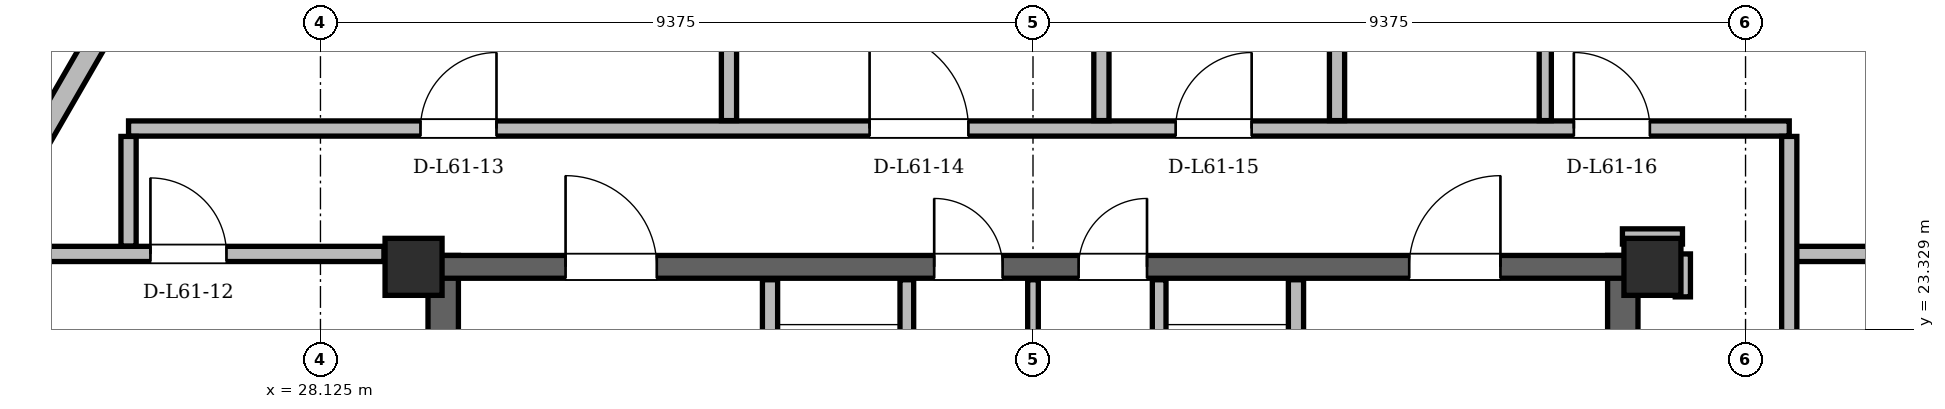
"""IFC4 building model, lengths in metres.
Left out: names, types, materials, properties, quantities, classifications, styles, units other than length and angle.
Written with IfcOpenShell. Run it as: python <this file> out.ifc"""

import sys

from ifc_helpers import new_model, si_unit, direction, frame, frame_2d, origin, origin_2d, place, context, subcontext, project, spatial, rectangle, hollow_rectangle, extrude, element, fill, save


model = new_model("IFC4")
c1 = context("Model", 3, precision=1e-05, world=origin(), true_north=direction((0.0, 1.0)))
c2 = subcontext(c1, "Body", "Model", "MODEL_VIEW")
j1 = project(units=[si_unit("LENGTHUNIT", "METRE"), si_unit("PLANEANGLEUNIT", "RADIAN")], contexts=[c1])
p1 = place(None, origin())
s1 = spatial("IfcSite", under=j1, at=p1, CompositionType="ELEMENT")
p2 = place(p1, origin())
s2 = spatial("IfcBuilding", under=s1, at=p2, CompositionType="ELEMENT")
p3 = place(p2, frame((0.0, 0.0, 230.7)))
s3 = spatial("IfcBuildingStorey", under=s2, at=p3, CompositionType="ELEMENT", Elevation=230.7)
for number, where, z_axis, x_axis in (
    (1, (45.65, 24.15, 0.0), (0.0, 0.0, 1.0), (1.0, 0.0, 0.0)),
    (2, (29.35, 24.15, 0.0), (0.0, 0.0, 1.0), (1.0, 0.0, 0.0)),
):
    element("IfcColumn", number, at=place(p3, frame(where, z_axis=z_axis, x_axis=x_axis)), inside=s3, PredefinedType="COLUMN", context=c2, shape_type="SweptSolid", body=[
        extrude(hollow_rectangle(XDim=0.75, YDim=0.75, WallThickness=0.06, at=origin_2d()), origin(), (0.0, 0.0, 1.0), 3.6),
    ])
for number, where, z_axis, x_axis in (
    (3, (29.74, 11.0, 0.0), (0.0, 0.0, 1.0), (0.0, 1.0, 0.0)),
    (4, (45.26, 11.0, 0.0), (0.0, 0.0, 1.0), (0.0, 1.0, 0.0)),
):
    element("IfcWall", number, at=place(p3, frame(where, z_axis=z_axis, x_axis=x_axis)), inside=s3, PredefinedType="SHEAR", context=c2, shape_type="SweptSolid", body=[
        extrude(rectangle(XDim=13.3, YDim=0.4, at=frame_2d((6.65, 0.0))), origin(), (0.0, 0.0, 1.0), 3.38),
    ])
p4 = place(p3, frame((29.65, 24.15, 0.0), z_axis=(0.0, 0.0, 1.0), x_axis=(1.0, 0.0, 0.0)))
e5 = element("IfcWall", 5, at=p4, inside=s3, PredefinedType="SHEAR", context=c2, shape_type="SweptSolid", body=[
    extrude(rectangle(XDim=15.7, YDim=0.3, at=frame_2d((7.85, 0.0))), origin(), (0.0, 0.0, 1.0), 3.38),
])
p5 = place(p4, frame((1.7, 0.0, 0.0)))
e6 = element("IfcOpeningElement", 6, at=p5, cuts=e5, PredefinedType="OPENING", context=c2, shape_type="SweptSolid", body=[
    extrude(rectangle(XDim=1.2, YDim=2.2, at=frame_2d((0.6, 1.1))), frame((0.0, 0.15, 0.0), z_axis=(0.0, -1.0, 0.0), x_axis=(1.0, 0.0, 0.0)), (0.0, 0.0, 1.0), 0.3),
])
p6 = place(p4, frame((12.8, 0.0, 0.0)))
e7 = element("IfcOpeningElement", 7, at=p6, cuts=e5, PredefinedType="OPENING", context=c2, shape_type="SweptSolid", body=[
    extrude(rectangle(XDim=1.2, YDim=2.2, at=frame_2d((0.6, 1.1))), frame((0.0, 0.15, 0.0), z_axis=(0.0, -1.0, 0.0), x_axis=(1.0, 0.0, 0.0)), (0.0, 0.0, 1.0), 0.3),
])
p7 = place(p4, frame((6.55, 0.0, 0.0)))
e8 = element("IfcOpeningElement", 8, at=p7, cuts=e5, PredefinedType="OPENING", context=c2, shape_type="SweptSolid", body=[
    extrude(rectangle(XDim=0.9, YDim=2.05, at=frame_2d((0.45, 1.025))), frame((0.0, 0.15, 0.0), z_axis=(0.0, -1.0, 0.0), x_axis=(1.0, 0.0, 0.0)), (0.0, 0.0, 1.0), 0.3),
])
p8 = place(p4, frame((8.45, 0.0, 0.0)))
e9 = element("IfcOpeningElement", 9, at=p8, cuts=e5, PredefinedType="OPENING", context=c2, shape_type="SweptSolid", body=[
    extrude(rectangle(XDim=0.9, YDim=2.05, at=frame_2d((0.45, 1.025))), frame((0.0, 0.15, 0.0), z_axis=(0.0, -1.0, 0.0), x_axis=(1.0, 0.0, 0.0)), (0.0, 0.0, 1.0), 0.3),
])
p9 = place(p3, frame((58.984, 11.26, 0.0), z_axis=(0.0, 0.0, 1.0), x_axis=(-0.50000331183, 0.86602349169, 0.0)))
e10 = element("IfcWall", 10, at=p9, inside=s3, PredefinedType="SOLIDWALL", context=c2, shape_type="SweptSolid", body=[
    extrude(rectangle(XDim=36.795, YDim=0.29, at=frame_2d((18.397, 0.0))), origin(), (0.0, 0.0, 1.0), 2.677),
])
p10 = place(p9, frame((3.219, 0.0, 0.0)))
e11 = element("IfcOpeningElement", 11, at=p10, cuts=e10, PredefinedType="OPENING", context=c2, shape_type="SweptSolid", body=[
    extrude(rectangle(XDim=1.5, YDim=2.2, at=frame_2d((0.75, 1.1))), frame((0.0, 0.145, 0.0), z_axis=(0.0, -1.0, 0.0), x_axis=(1.0, 0.0, 0.0)), (0.0, 0.0, 1.0), 0.29),
])
p11 = place(p9, frame((27.151, 0.0, 0.0)))
e12 = element("IfcOpeningElement", 12, at=p11, cuts=e10, PredefinedType="OPENING", context=c2, shape_type="SweptSolid", body=[
    extrude(rectangle(XDim=1.3, YDim=2.2, at=frame_2d((0.65, 1.1))), frame((0.0, 0.145, 0.0), z_axis=(0.0, -1.0, 0.0), x_axis=(1.0, 0.0, 0.0)), (0.0, 0.0, 1.0), 0.29),
])
p12 = place(p9, frame((1.169, 0.0, 0.85)))
e13 = element("IfcOpeningElement", 13, at=p12, cuts=e10, PredefinedType="OPENING", context=c2, shape_type="SweptSolid", body=[
    extrude(rectangle(XDim=1.2, YDim=1.48, at=frame_2d((0.6, 0.74))), frame((0.0, 0.145, 0.0), z_axis=(0.0, -1.0, 0.0), x_axis=(1.0, 0.0, 0.0)), (0.0, 0.0, 1.0), 0.29),
])
p13 = place(p9, frame((7.888, 0.0, 0.85)))
e14 = element("IfcOpeningElement", 14, at=p13, cuts=e10, PredefinedType="OPENING", context=c2, shape_type="SweptSolid", body=[
    extrude(rectangle(XDim=1.2, YDim=1.48, at=frame_2d((0.6, 0.74))), frame((0.0, 0.145, 0.0), z_axis=(0.0, -1.0, 0.0), x_axis=(1.0, 0.0, 0.0)), (0.0, 0.0, 1.0), 0.29),
])
p14 = place(p9, frame((32.464, 0.0, 0.85)))
e15 = element("IfcOpeningElement", 15, at=p14, cuts=e10, PredefinedType="OPENING", context=c2, shape_type="SweptSolid", body=[
    extrude(rectangle(XDim=1.2, YDim=1.48, at=frame_2d((0.6, 0.74))), frame((0.0, 0.145, 0.0), z_axis=(0.0, -1.0, 0.0), x_axis=(1.0, 0.0, 0.0)), (0.0, 0.0, 1.0), 0.29),
])
p15 = place(p9, frame((16.904, 0.0, 0.85)))
e16 = element("IfcOpeningElement", 16, at=p15, cuts=e10, PredefinedType="OPENING", context=c2, shape_type="SweptSolid", body=[
    extrude(rectangle(XDim=2.0, YDim=1.717, at=frame_2d((1.0, 0.858))), frame((0.0, 0.145, 0.0), z_axis=(0.0, -1.0, 0.0), x_axis=(1.0, 0.0, 0.0)), (0.0, 0.0, 1.0), 0.29),
])
p16 = place(p9, frame((23.036, 0.0, 0.85)))
e17 = element("IfcOpeningElement", 17, at=p16, cuts=e10, PredefinedType="OPENING", context=c2, shape_type="SweptSolid", body=[
    extrude(rectangle(XDim=1.4, YDim=1.6, at=frame_2d((0.7, 0.8))), frame((0.0, 0.145, 0.0), z_axis=(0.0, -1.0, 0.0), x_axis=(1.0, 0.0, 0.0)), (0.0, 0.0, 1.0), 0.29),
])
p17 = place(p3, frame((34.414, 43.126, 0.0), z_axis=(0.0, 0.0, 1.0), x_axis=(-0.50000331183, -0.86602349169, 0.0)))
e18 = element("IfcWall", 18, at=p17, inside=s3, PredefinedType="SOLIDWALL", context=c2, shape_type="SweptSolid", body=[
    extrude(rectangle(XDim=36.795, YDim=0.29, at=frame_2d((18.397, 0.0))), origin(), (0.0, 0.0, 1.0), 2.677),
])
p18 = place(p17, frame((3.529, 0.0, 0.0)))
e19 = element("IfcOpeningElement", 19, at=p18, cuts=e18, PredefinedType="OPENING", context=c2, shape_type="SweptSolid", body=[
    extrude(rectangle(XDim=1.3, YDim=2.2, at=frame_2d((0.65, 1.1))), frame((0.0, 0.145, 0.0), z_axis=(0.0, -1.0, 0.0), x_axis=(1.0, 0.0, 0.0)), (0.0, 0.0, 1.0), 0.29),
])
p19 = place(p17, frame((27.261, 0.0, 0.0)))
e20 = element("IfcOpeningElement", 20, at=p19, cuts=e18, PredefinedType="OPENING", context=c2, shape_type="SweptSolid", body=[
    extrude(rectangle(XDim=1.5, YDim=2.2, at=frame_2d((0.75, 1.1))), frame((0.0, 0.145, 0.0), z_axis=(0.0, -1.0, 0.0), x_axis=(1.0, 0.0, 0.0)), (0.0, 0.0, 1.0), 0.29),
])
p20 = place(p17, frame((22.271, 0.0, 0.85)))
e21 = element("IfcOpeningElement", 21, at=p20, cuts=e18, PredefinedType="OPENING", context=c2, shape_type="SweptSolid", body=[
    extrude(rectangle(XDim=2.4, YDim=1.717, at=frame_2d((1.2, 0.858))), frame((0.0, 0.145, 0.0), z_axis=(0.0, -1.0, 0.0), x_axis=(1.0, 0.0, 0.0)), (0.0, 0.0, 1.0), 0.29),
])
p21 = place(p17, frame((33.406, 0.0, 0.85)))
e22 = element("IfcOpeningElement", 22, at=p21, cuts=e18, PredefinedType="OPENING", context=c2, shape_type="SweptSolid", body=[
    extrude(rectangle(XDim=2.2, YDim=1.717, at=frame_2d((1.1, 0.858))), frame((0.0, 0.145, 0.0), z_axis=(0.0, -1.0, 0.0), x_axis=(1.0, 0.0, 0.0)), (0.0, 0.0, 1.0), 0.29),
])
p22 = place(p17, frame((11.662, 0.0, 0.85)))
e23 = element("IfcOpeningElement", 23, at=p22, cuts=e18, PredefinedType="OPENING", context=c2, shape_type="SweptSolid", body=[
    extrude(rectangle(XDim=1.2, YDim=1.48, at=frame_2d((0.6, 0.74))), frame((0.0, 0.145, 0.0), z_axis=(0.0, -1.0, 0.0), x_axis=(1.0, 0.0, 0.0)), (0.0, 0.0, 1.0), 0.29),
])
p23 = place(p17, frame((16.295, 0.0, 0.85)))
e24 = element("IfcOpeningElement", 24, at=p23, cuts=e18, PredefinedType="OPENING", context=c2, shape_type="SweptSolid", body=[
    extrude(rectangle(XDim=1.8, YDim=1.717, at=frame_2d((0.9, 0.858))), frame((0.0, 0.145, 0.0), z_axis=(0.0, -1.0, 0.0), x_axis=(1.0, 0.0, 0.0)), (0.0, 0.0, 1.0), 0.29),
])
p24 = place(p3, frame((34.04, 19.48, 0.0), z_axis=(0.0, 0.0, 1.0), x_axis=(0.0, 1.0, 0.0)))
e25 = element("IfcWall", 25, at=p24, inside=s3, PredefinedType="PARTITIONING", context=c2, shape_type="SweptSolid", body=[
    extrude(rectangle(XDim=4.5, YDim=0.2, at=frame_2d((2.25, 0.0))), origin(), (0.0, 0.0, 1.0), 3.38),
])
p25 = place(p24, frame((2.12, 0.0, 0.0)))
e26 = element("IfcOpeningElement", 26, at=p25, cuts=e25, PredefinedType="OPENING", context=c2, shape_type="SweptSolid", body=[
    extrude(rectangle(XDim=1.1, YDim=2.2, at=frame_2d((0.55, 1.1))), frame((0.0, 0.1, 0.0), z_axis=(0.0, -1.0, 0.0), x_axis=(1.0, 0.0, 0.0)), (0.0, 0.0, 1.0), 0.2),
])
p26 = place(p3, frame((35.84, 20.96, 0.0), z_axis=(0.0, 0.0, 1.0), x_axis=(0.0, 1.0, 0.0)))
e27 = element("IfcWall", 27, at=p26, inside=s3, PredefinedType="PARTITIONING", context=c2, shape_type="SweptSolid", body=[
    extrude(rectangle(XDim=3.02, YDim=0.18, at=frame_2d((1.51, 0.0))), origin(), (0.0, 0.0, 1.0), 3.38),
])
p27 = place(p3, frame((40.96, 19.48, 0.0), z_axis=(0.0, 0.0, 1.0), x_axis=(0.0, 1.0, 0.0)))
e28 = element("IfcWall", 28, at=p27, inside=s3, PredefinedType="PARTITIONING", context=c2, shape_type="SweptSolid", body=[
    extrude(rectangle(XDim=4.5, YDim=0.2, at=frame_2d((2.25, 0.0))), origin(), (0.0, 0.0, 1.0), 3.38),
])
p28 = place(p27, frame((2.12, 0.0, 0.0)))
e29 = element("IfcOpeningElement", 29, at=p28, cuts=e28, PredefinedType="OPENING", context=c2, shape_type="SweptSolid", body=[
    extrude(rectangle(XDim=1.1, YDim=2.2, at=frame_2d((0.55, 1.1))), frame((0.0, 0.1, 0.0), z_axis=(0.0, -1.0, 0.0), x_axis=(1.0, 0.0, 0.0)), (0.0, 0.0, 1.0), 0.2),
])
p29 = place(p3, frame((39.16, 20.96, 0.0), z_axis=(0.0, 0.0, 1.0), x_axis=(0.0, 1.0, 0.0)))
e30 = element("IfcWall", 30, at=p29, inside=s3, PredefinedType="PARTITIONING", context=c2, shape_type="SweptSolid", body=[
    extrude(rectangle(XDim=3.02, YDim=0.18, at=frame_2d((1.51, 0.0))), origin(), (0.0, 0.0, 1.0), 3.38),
])
p30 = place(p3, frame((37.5, 21.06, 0.0), z_axis=(0.0, 0.0, 1.0), x_axis=(0.0, 1.0, 0.0)))
e31 = element("IfcWall", 31, at=p30, inside=s3, PredefinedType="PARTITIONING", context=c2, shape_type="SweptSolid", body=[
    extrude(rectangle(XDim=2.92, YDim=0.14, at=frame_2d((1.46, 0.0))), origin(), (0.0, 0.0, 1.0), 3.38),
])
p31 = place(p3, frame((23.728, 24.32, 0.0), z_axis=(0.0, 0.0, 1.0), x_axis=(1.0, 0.0, 0.0)))
e32 = element("IfcWall", 32, at=p31, inside=s3, PredefinedType="PARTITIONING", context=c2, shape_type="SweptSolid", body=[
    extrude(rectangle(XDim=5.232, YDim=0.2, at=frame_2d((2.616, 0.0))), origin(), (0.0, 0.0, 1.0), 3.38),
])
p32 = place(p31, frame((2.16, 0.0, 0.0)))
e33 = element("IfcOpeningElement", 33, at=p32, cuts=e32, PredefinedType="OPENING", context=c2, shape_type="SweptSolid", body=[
    extrude(rectangle(XDim=1.0, YDim=2.18, at=frame_2d((0.5, 1.09))), frame((0.0, 0.1, 0.0), z_axis=(0.0, -1.0, 0.0), x_axis=(1.0, 0.0, 0.0)), (0.0, 0.0, 1.0), 0.2),
])
p33 = place(p3, frame((47.45, 24.32, 0.0), z_axis=(0.0, 0.0, 1.0), x_axis=(1.0, 0.0, 0.0)))
e34 = element("IfcWall", 34, at=p33, inside=s3, PredefinedType="PARTITIONING", context=c2, shape_type="SweptSolid", body=[
    extrude(rectangle(XDim=3.822, YDim=0.2, at=frame_2d((1.911, 0.0))), origin(), (0.0, 0.0, 1.0), 3.38),
])
p34 = place(p3, frame((45.255, 24.55, 0.0), z_axis=(0.0, 0.0, 1.0), x_axis=(1.0, 0.0, 0.0)))
e35 = element("IfcWall", 35, at=p34, inside=s3, PredefinedType="PARTITIONING", context=c2, shape_type="SweptSolid", body=[
    extrude(rectangle(XDim=0.79, YDim=0.2, at=frame_2d((0.395, 0.0))), origin(), (0.0, 0.0, 1.0), 2.913),
])
p35 = place(p3, frame((25.6, 25.97, 0.0), z_axis=(0.0, 0.0, 1.0), x_axis=(1.0, 0.0, 0.0)))
e36 = element("IfcWall", 36, at=p35, inside=s3, PredefinedType="PARTITIONING", context=c2, shape_type="SweptSolid", body=[
    extrude(rectangle(XDim=21.85, YDim=0.2, at=frame_2d((10.925, 0.0))), origin(), (0.0, 0.0, 1.0), 2.913),
])
p36 = place(p35, frame((3.841, 0.0, 0.0)))
e37 = element("IfcOpeningElement", 37, at=p36, cuts=e36, PredefinedType="OPENING", context=c2, shape_type="SweptSolid", body=[
    extrude(rectangle(XDim=1.0, YDim=2.18, at=frame_2d((0.5, 1.09))), frame((0.0, 0.1, 0.0), z_axis=(0.0, -1.0, 0.0), x_axis=(1.0, 0.0, 0.0)), (0.0, 0.0, 1.0), 0.2),
])
p37 = place(p35, frame((9.75, 0.0, 0.0)))
e38 = element("IfcOpeningElement", 38, at=p37, cuts=e36, PredefinedType="OPENING", context=c2, shape_type="SweptSolid", body=[
    extrude(rectangle(XDim=1.3, YDim=2.2, at=frame_2d((0.65, 1.1))), frame((0.0, 0.1, 0.0), z_axis=(0.0, -1.0, 0.0), x_axis=(1.0, 0.0, 0.0)), (0.0, 0.0, 1.0), 0.2),
])
p38 = place(p35, frame((13.777, 0.0, 0.0)))
e39 = element("IfcOpeningElement", 39, at=p38, cuts=e36, PredefinedType="OPENING", context=c2, shape_type="SweptSolid", body=[
    extrude(rectangle(XDim=1.0, YDim=2.18, at=frame_2d((0.5, 1.09))), frame((0.0, 0.1, 0.0), z_axis=(0.0, -1.0, 0.0), x_axis=(1.0, 0.0, 0.0)), (0.0, 0.0, 1.0), 0.2),
])
p39 = place(p35, frame((19.016, 0.0, 0.0)))
e40 = element("IfcOpeningElement", 40, at=p39, cuts=e36, PredefinedType="OPENING", context=c2, shape_type="SweptSolid", body=[
    extrude(rectangle(XDim=1.0, YDim=2.18, at=frame_2d((0.5, 1.09))), frame((0.0, 0.1, 0.0), z_axis=(0.0, -1.0, 0.0), x_axis=(1.0, 0.0, 0.0)), (0.0, 0.0, 1.0), 0.2),
])
p40 = place(p3, frame((25.6, 24.424, 0.0), z_axis=(0.0, 0.0, 1.0), x_axis=(0.0, 1.0, 0.0)))
e41 = element("IfcWall", 41, at=p40, inside=s3, PredefinedType="PARTITIONING", context=c2, shape_type="SweptSolid", body=[
    extrude(rectangle(XDim=1.442, YDim=0.2, at=frame_2d((0.721, 0.0))), origin(), (0.0, 0.0, 1.0), 3.38),
])
p41 = place(p3, frame((33.5, 26.074, 0.0), z_axis=(0.0, 0.0, 1.0), x_axis=(0.0, 1.0, 0.0)))
e42 = element("IfcWall", 42, at=p41, inside=s3, PredefinedType="PARTITIONING", context=c2, shape_type="SweptSolid", body=[
    extrude(rectangle(XDim=15.172, YDim=0.2, at=frame_2d((7.586, 0.0))), origin(), (0.0, 0.0, 1.0), 2.913),
])
p42 = place(p3, frame((38.4, 26.074, 0.0), z_axis=(0.0, 0.0, 1.0), x_axis=(0.0, 1.0, 0.0)))
e43 = element("IfcWall", 43, at=p42, inside=s3, PredefinedType="PARTITIONING", context=c2, shape_type="SweptSolid", body=[
    extrude(rectangle(XDim=4.292, YDim=0.2, at=frame_2d((2.146, 0.0))), origin(), (0.0, 0.0, 1.0), 3.38),
])
p43 = place(p3, frame((41.5, 26.074, 0.0), z_axis=(0.0, 0.0, 1.0), x_axis=(0.0, 1.0, 0.0)))
e44 = element("IfcWall", 44, at=p43, inside=s3, PredefinedType="PARTITIONING", context=c2, shape_type="SweptSolid", body=[
    extrude(rectangle(XDim=15.172, YDim=0.2, at=frame_2d((7.586, 0.0))), origin(), (0.0, 0.0, 1.0), 2.913),
])
p44 = place(p3, frame((44.24, 26.074, 0.0), z_axis=(0.0, 0.0, 1.0), x_axis=(0.0, 1.0, 0.0)))
e45 = element("IfcWall", 45, at=p44, inside=s3, PredefinedType="PARTITIONING", context=c2, shape_type="SweptSolid", body=[
    extrude(rectangle(XDim=10.426, YDim=0.16, at=frame_2d((5.213, 0.0))), origin(), (0.0, 0.0, 1.0), 2.913),
])
p45 = place(p44, frame((2.492, 0.0, 0.0)))
e46 = element("IfcOpeningElement", 46, at=p45, cuts=e45, PredefinedType="OPENING", context=c2, shape_type="SweptSolid", body=[
    extrude(rectangle(XDim=0.92, YDim=2.12, at=frame_2d((0.46, 1.06))), frame((0.0, 0.08, 0.0), z_axis=(0.0, -1.0, 0.0), x_axis=(1.0, 0.0, 0.0)), (0.0, 0.0, 1.0), 0.16),
])
p46 = place(p44, frame((6.814, 0.0, 0.0)))
e47 = element("IfcOpeningElement", 47, at=p46, cuts=e45, PredefinedType="OPENING", context=c2, shape_type="SweptSolid", body=[
    extrude(rectangle(XDim=0.95, YDim=2.1, at=frame_2d((0.475, 1.05))), frame((0.0, 0.08, 0.0), z_axis=(0.0, -1.0, 0.0), x_axis=(1.0, 0.0, 0.0)), (0.0, 0.0, 1.0), 0.16),
])
p47 = place(p44, frame((9.061, 0.0, 0.0)))
e48 = element("IfcOpeningElement", 48, at=p47, cuts=e45, PredefinedType="OPENING", context=c2, shape_type="SweptSolid", body=[
    extrude(rectangle(XDim=0.88, YDim=2.08, at=frame_2d((0.44, 1.04))), frame((0.0, 0.08, 0.0), z_axis=(0.0, -1.0, 0.0), x_axis=(1.0, 0.0, 0.0)), (0.0, 0.0, 1.0), 0.16),
])
p48 = place(p3, frame((46.05, 23.755, 0.0), z_axis=(0.0, 0.0, 1.0), x_axis=(0.0, 1.0, 0.0)))
e49 = element("IfcWall", 49, at=p48, inside=s3, PredefinedType="PARTITIONING", context=c2, shape_type="SweptSolid", body=[
    extrude(rectangle(XDim=0.565, YDim=0.2, at=frame_2d((0.283, 0.0))), origin(), (0.0, 0.0, 1.0), 3.38),
])
p49 = place(p3, frame((47.45, 9.404, 0.0), z_axis=(0.0, 0.0, 1.0), x_axis=(0.0, 1.0, 0.0)))
e50 = element("IfcWall", 50, at=p49, inside=s3, PredefinedType="PARTITIONING", context=c2, shape_type="SweptSolid", body=[
    extrude(rectangle(XDim=16.462, YDim=0.2, at=frame_2d((8.231, 0.0))), origin(), (0.0, 0.0, 1.0), 2.913),
])
p50 = place(p49, frame((3.163, 0.0, 0.0)))
e51 = element("IfcOpeningElement", 51, at=p50, cuts=e50, PredefinedType="OPENING", context=c2, shape_type="SweptSolid", body=[
    extrude(rectangle(XDim=1.0, YDim=2.18, at=frame_2d((0.5, 1.09))), frame((0.0, 0.1, 0.0), z_axis=(0.0, -1.0, 0.0), x_axis=(1.0, 0.0, 0.0)), (0.0, 0.0, 1.0), 0.2),
])
p51 = place(p49, frame((9.778, 0.0, 0.0)))
e52 = element("IfcOpeningElement", 52, at=p51, cuts=e50, PredefinedType="OPENING", context=c2, shape_type="SweptSolid", body=[
    extrude(rectangle(XDim=1.0, YDim=2.18, at=frame_2d((0.5, 1.09))), frame((0.0, 0.1, 0.0), z_axis=(0.0, -1.0, 0.0), x_axis=(1.0, 0.0, 0.0)), (0.0, 0.0, 1.0), 0.2),
])
p52 = place(p5, origin())
e53 = element("IfcDoor", 53, at=p52, inside=s3, OperationType="SINGLE_SWING_LEFT", PredefinedType="DOOR", context=c2, shape_type="SweptSolid", body=[
    extrude(rectangle(XDim=1.2, YDim=2.2, at=frame_2d((0.6, 1.1))), frame((0.0, 0.025, 0.0), z_axis=(0.0, -1.0, 0.0), x_axis=(1.0, 0.0, 0.0)), (0.0, 0.0, 1.0), 0.05),
])
fill(e6, e53)
p53 = place(p6, origin())
e54 = element("IfcDoor", 54, at=p53, inside=s3, OperationType="SINGLE_SWING_RIGHT", PredefinedType="DOOR", context=c2, shape_type="SweptSolid", body=[
    extrude(rectangle(XDim=1.2, YDim=2.2, at=frame_2d((0.6, 1.1))), frame((0.0, 0.025, 0.0), z_axis=(0.0, -1.0, 0.0), x_axis=(1.0, 0.0, 0.0)), (0.0, 0.0, 1.0), 0.05),
])
fill(e7, e54)
p54 = place(p7, origin())
e55 = element("IfcDoor", 55, at=p54, inside=s3, OperationType="SINGLE_SWING_LEFT", PredefinedType="DOOR", context=c2, shape_type="SweptSolid", body=[
    extrude(rectangle(XDim=0.9, YDim=2.05, at=frame_2d((0.45, 1.025))), frame((0.0, 0.025, 0.0), z_axis=(0.0, -1.0, 0.0), x_axis=(1.0, 0.0, 0.0)), (0.0, 0.0, 1.0), 0.05),
])
fill(e8, e55)
p55 = place(p8, origin())
e56 = element("IfcDoor", 56, at=p55, inside=s3, OperationType="SINGLE_SWING_RIGHT", PredefinedType="DOOR", context=c2, shape_type="SweptSolid", body=[
    extrude(rectangle(XDim=0.9, YDim=2.05, at=frame_2d((0.45, 1.025))), frame((0.0, 0.025, 0.0), z_axis=(0.0, -1.0, 0.0), x_axis=(1.0, 0.0, 0.0)), (0.0, 0.0, 1.0), 0.05),
])
fill(e9, e56)
p56 = place(p32, origin())
e57 = element("IfcDoor", 57, at=p56, inside=s3, OperationType="SINGLE_SWING_LEFT", PredefinedType="DOOR", context=c2, shape_type="SweptSolid", body=[
    extrude(rectangle(XDim=1.0, YDim=2.18, at=frame_2d((0.5, 1.09))), frame((0.0, 0.025, 0.0), z_axis=(0.0, -1.0, 0.0), x_axis=(1.0, 0.0, 0.0)), (0.0, 0.0, 1.0), 0.05),
])
fill(e33, e57)
p57 = place(p36, origin())
e58 = element("IfcDoor", 58, at=p57, inside=s3, OperationType="SINGLE_SWING_RIGHT", PredefinedType="DOOR", context=c2, shape_type="SweptSolid", body=[
    extrude(rectangle(XDim=1.0, YDim=2.18, at=frame_2d((0.5, 1.09))), frame((0.0, 0.025, 0.0), z_axis=(0.0, -1.0, 0.0), x_axis=(1.0, 0.0, 0.0)), (0.0, 0.0, 1.0), 0.05),
])
fill(e37, e58)
p58 = place(p37, origin())
e59 = element("IfcDoor", 59, at=p58, inside=s3, OperationType="SINGLE_SWING_LEFT", PredefinedType="DOOR", context=c2, shape_type="SweptSolid", body=[
    extrude(rectangle(XDim=1.3, YDim=2.2, at=frame_2d((0.65, 1.1))), frame((0.0, 0.025, 0.0), z_axis=(0.0, -1.0, 0.0), x_axis=(1.0, 0.0, 0.0)), (0.0, 0.0, 1.0), 0.05),
])
fill(e38, e59)
p59 = place(p38, origin())
e60 = element("IfcDoor", 60, at=p59, inside=s3, OperationType="SINGLE_SWING_RIGHT", PredefinedType="DOOR", context=c2, shape_type="SweptSolid", body=[
    extrude(rectangle(XDim=1.0, YDim=2.18, at=frame_2d((0.5, 1.09))), frame((0.0, 0.025, 0.0), z_axis=(0.0, -1.0, 0.0), x_axis=(1.0, 0.0, 0.0)), (0.0, 0.0, 1.0), 0.05),
])
fill(e39, e60)
p60 = place(p39, origin())
e61 = element("IfcDoor", 61, at=p60, inside=s3, OperationType="SINGLE_SWING_LEFT", PredefinedType="DOOR", context=c2, shape_type="SweptSolid", body=[
    extrude(rectangle(XDim=1.0, YDim=2.18, at=frame_2d((0.5, 1.09))), frame((0.0, 0.025, 0.0), z_axis=(0.0, -1.0, 0.0), x_axis=(1.0, 0.0, 0.0)), (0.0, 0.0, 1.0), 0.05),
])
fill(e40, e61)
save(model, sys.argv[1])
